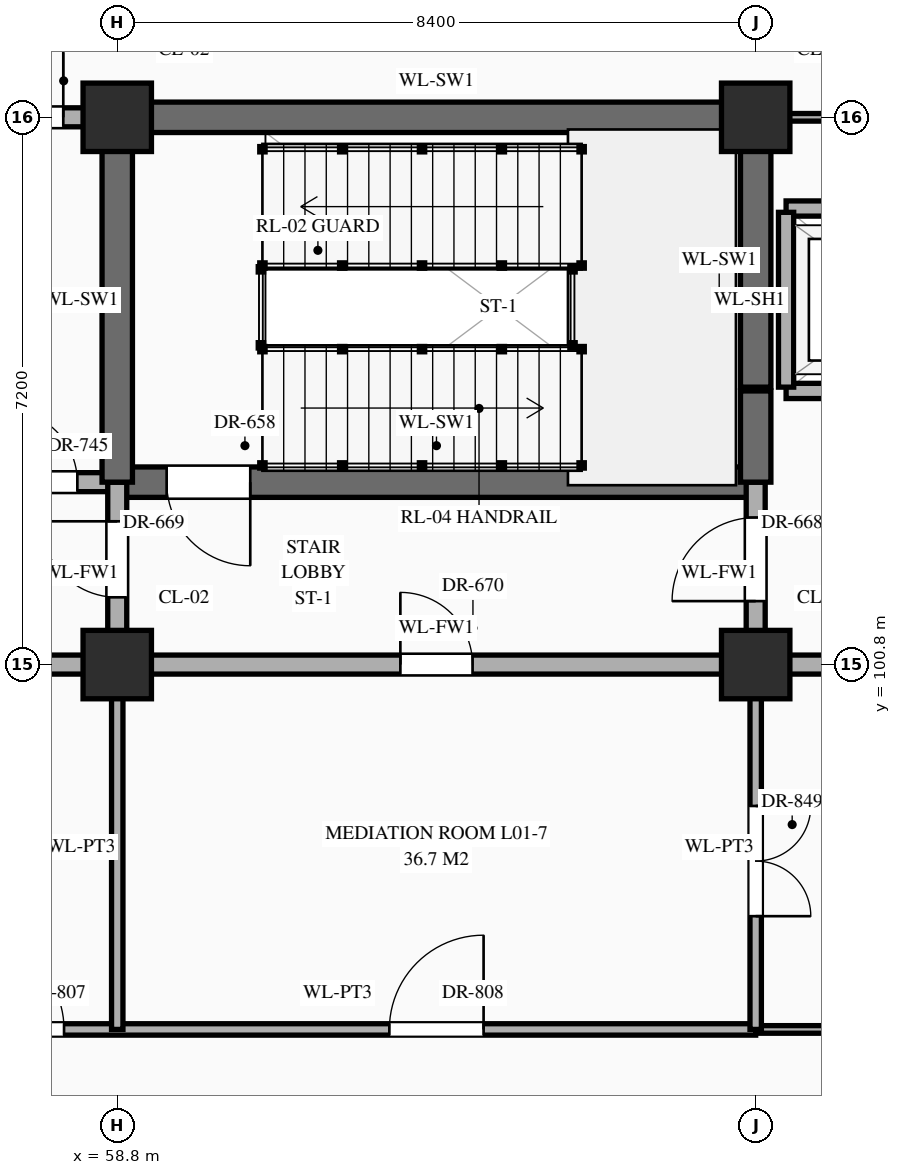
"""IFC4 building model, lengths in metres.
Left out: names, types, materials, properties, quantities, classifications, styles, units other than length and angle.
Written with IfcOpenShell. Run it as: python <this file> out.ifc"""

import sys

from ifc_helpers import new_model, si_unit, direction, frame, frame_2d, origin, origin_2d, place, context, subcontext, project, spatial, rectangle, extrude, element, fill, save


model = new_model("IFC4")
c1 = context("Model", 3, precision=1e-05, world=origin(), true_north=direction((0.0, 1.0)))
c2 = subcontext(c1, "Body", "Model", "MODEL_VIEW")
j1 = project(units=[si_unit("LENGTHUNIT", "METRE"), si_unit("PLANEANGLEUNIT", "RADIAN")], contexts=[c1])
p1 = place(None, origin())
s1 = spatial("IfcSite", under=j1, at=p1, CompositionType="ELEMENT")
p2 = place(p1, origin())
s2 = spatial("IfcBuilding", under=s1, at=p2, CompositionType="ELEMENT")
p3 = place(p2, origin())
s3 = spatial("IfcBuildingStorey", under=s2, at=p3, CompositionType="ELEMENT", Elevation=0.0)
for number, where, z_axis, x_axis in (
    (1, (58.8, 100.8, 0.0), (0.0, 0.0, 1.0), (1.0, 0.0, 0.0)),
    (2, (58.8, 108.0, 0.0), (0.0, 0.0, 1.0), (1.0, 0.0, 0.0)),
    (3, (67.2, 100.8, 0.0), (0.0, 0.0, 1.0), (1.0, 0.0, 0.0)),
    (4, (67.2, 108.0, 0.0), (0.0, 0.0, 1.0), (1.0, 0.0, 0.0)),
):
    element("IfcColumn", number, at=place(p3, frame(where, z_axis=z_axis, x_axis=x_axis)), inside=s3, PredefinedType="COLUMN", context=c2, shape_type="SweptSolid", body=[
        extrude(rectangle(XDim=0.9, YDim=0.9, at=origin_2d()), origin(), (0.0, 0.0, 1.0), 5.4),
    ])
p4 = place(p3, frame((56.2, 96.0, 0.0), z_axis=(0.0, 0.0, 1.0), x_axis=(1.0, 0.0, 0.0)))
e5 = element("IfcWall", 5, at=p4, inside=s3, PredefinedType="STANDARD", context=c2, shape_type="SweptSolid", body=[
    extrude(rectangle(XDim=11.0, YDim=0.15, at=frame_2d((5.5, 0.0))), origin(), (0.0, 0.0, 1.0), 5.12),
])
p5 = place(p4, frame((0.7, 0.0, 0.0)))
e6 = element("IfcOpeningElement", 6, at=p5, cuts=e5, PredefinedType="OPENING", context=c2, shape_type="SweptSolid", body=[
    extrude(rectangle(XDim=1.2, YDim=2.35, at=frame_2d((0.6, 1.175))), frame((0.0, 0.087, 0.0), z_axis=(0.0, -1.0, 0.0), x_axis=(1.0, 0.0, 0.0)), (0.0, 0.0, 1.0), 0.174),
])
p6 = place(p4, frame((6.18, 0.0, 0.0)))
e7 = element("IfcOpeningElement", 7, at=p6, cuts=e5, PredefinedType="OPENING", context=c2, shape_type="SweptSolid", body=[
    extrude(rectangle(XDim=1.24, YDim=2.3, at=frame_2d((0.62, 1.15))), frame((0.0, 0.087, 0.0), z_axis=(0.0, -1.0, 0.0), x_axis=(1.0, 0.0, 0.0)), (0.0, 0.0, 1.0), 0.174),
])
p7 = place(p3, frame((67.2, 96.0, 0.0), z_axis=(0.0, 0.0, 1.0), x_axis=(1.0, 0.0, 0.0)))
e8 = element("IfcWall", 8, at=p7, inside=s3, PredefinedType="STANDARD", context=c2, shape_type="SweptSolid", body=[
    extrude(rectangle(XDim=33.6, YDim=0.1, at=frame_2d((16.8, 0.0))), origin(), (0.0, 0.0, 1.0), 5.12),
])
p8 = place(p7, frame((7.5, 0.0, 0.0)))
e9 = element("IfcOpeningElement", 9, at=p8, cuts=e8, PredefinedType="OPENING", context=c2, shape_type="SweptSolid", body=[
    extrude(rectangle(XDim=1.8, YDim=2.5, at=frame_2d((0.9, 1.25))), frame((0.0, 0.062, 0.0), z_axis=(0.0, -1.0, 0.0), x_axis=(1.0, 0.0, 0.0)), (0.0, 0.0, 1.0), 0.124),
])
p9 = place(p7, frame((24.25, 0.0, 0.0)))
e10 = element("IfcOpeningElement", 10, at=p9, cuts=e8, PredefinedType="OPENING", context=c2, shape_type="SweptSolid", body=[
    extrude(rectangle(XDim=1.9, YDim=2.5, at=frame_2d((0.95, 1.25))), frame((0.0, 0.062, 0.0), z_axis=(0.0, -1.0, 0.0), x_axis=(1.0, 0.0, 0.0)), (0.0, 0.0, 1.0), 0.124),
])
p10 = place(p3, frame((54.6, 100.8, 0.0), z_axis=(0.0, 0.0, 1.0), x_axis=(1.0, 0.0, 0.0)))
e11 = element("IfcWall", 11, at=p10, inside=s3, PredefinedType="STANDARD", context=c2, shape_type="SweptSolid", body=[
    extrude(rectangle(XDim=16.8, YDim=0.25, at=frame_2d((8.4, 0.0))), origin(), (0.0, 0.0, 1.0), 4.27),
])
p11 = place(p10, frame((7.925, 0.0, 0.0)))
e12 = element("IfcOpeningElement", 12, at=p11, cuts=e11, PredefinedType="OPENING", context=c2, shape_type="SweptSolid", body=[
    extrude(rectangle(XDim=0.95, YDim=2.15, at=frame_2d((0.475, 1.075))), frame((0.0, 0.137, 0.0), z_axis=(0.0, -1.0, 0.0), x_axis=(1.0, 0.0, 0.0)), (0.0, 0.0, 1.0), 0.274),
])
p12 = place(p10, frame((13.985, 0.0, 0.0)))
e13 = element("IfcOpeningElement", 13, at=p12, cuts=e11, PredefinedType="OPENING", context=c2, shape_type="SweptSolid", body=[
    extrude(rectangle(XDim=1.8, YDim=2.35, at=frame_2d((0.9, 1.175))), frame((0.0, 0.137, 0.0), z_axis=(0.0, -1.0, 0.0), x_axis=(1.0, 0.0, 0.0)), (0.0, 0.0, 1.0), 0.274),
])
p13 = place(p10, frame((0.25, 0.0, 0.0)))
e14 = element("IfcOpeningElement", 14, at=p13, cuts=e11, PredefinedType="OPENING", context=c2, shape_type="SweptSolid", body=[
    extrude(rectangle(XDim=1.1, YDim=2.2, at=frame_2d((0.55, 1.1))), frame((0.0, 0.137, 0.0), z_axis=(0.0, -1.0, 0.0), x_axis=(1.0, 0.0, 0.0)), (0.0, 0.0, 1.0), 0.274),
])
p14 = place(p3, frame((54.6, 103.2, 0.0), z_axis=(0.0, 0.0, 1.0), x_axis=(1.0, 0.0, 0.0)))
e15 = element("IfcWall", 15, at=p14, inside=s3, PredefinedType="STANDARD", context=c2, shape_type="SweptSolid", body=[
    extrude(rectangle(XDim=4.2, YDim=0.25, at=frame_2d((2.1, 0.0))), origin(), (0.0, 0.0, 1.0), 5.12),
])
p15 = place(p14, frame((0.6, 0.0, 0.0)))
e16 = element("IfcOpeningElement", 16, at=p15, cuts=e15, PredefinedType="OPENING", context=c2, shape_type="SweptSolid", body=[
    extrude(rectangle(XDim=1.0, YDim=2.2, at=frame_2d((0.5, 1.1))), frame((0.0, 0.137, 0.0), z_axis=(0.0, -1.0, 0.0), x_axis=(1.0, 0.0, 0.0)), (0.0, 0.0, 1.0), 0.274),
])
p16 = place(p14, frame((2.725, 0.0, 0.0)))
e17 = element("IfcOpeningElement", 17, at=p16, cuts=e15, PredefinedType="OPENING", context=c2, shape_type="SweptSolid", body=[
    extrude(rectangle(XDim=0.95, YDim=2.15, at=frame_2d((0.475, 1.075))), frame((0.0, 0.137, 0.0), z_axis=(0.0, -1.0, 0.0), x_axis=(1.0, 0.0, 0.0)), (0.0, 0.0, 1.0), 0.274),
])
p17 = place(p3, frame((58.8, 103.2, 0.0), z_axis=(0.0, 0.0, 1.0), x_axis=(1.0, 0.0, 0.0)))
e18 = element("IfcWall", 18, at=p17, inside=s3, PredefinedType="SHEAR", context=c2, shape_type="SweptSolid", body=[
    extrude(rectangle(XDim=8.4, YDim=0.4, at=frame_2d((4.2, 0.0))), origin(), (0.0, 0.0, 1.0), 5.12),
])
p18 = place(p17, frame((0.65, 0.0, 0.0)))
e19 = element("IfcOpeningElement", 19, at=p18, cuts=e18, PredefinedType="OPENING", context=c2, shape_type="SweptSolid", body=[
    extrude(rectangle(XDim=1.1, YDim=2.2, at=frame_2d((0.55, 1.1))), frame((0.0, 0.212, 0.0), z_axis=(0.0, -1.0, 0.0), x_axis=(1.0, 0.0, 0.0)), (0.0, 0.0, 1.0), 0.424),
])
p19 = place(p3, frame((67.6, 104.4, 0.0), z_axis=(0.0, 0.0, 1.0), x_axis=(1.0, 0.0, 0.0)))
e20 = element("IfcWall", 20, at=p19, inside=s3, PredefinedType="STANDARD", context=c2, shape_type="SweptSolid", body=[
    extrude(rectangle(XDim=3.0, YDim=0.2, at=frame_2d((1.5, 0.0))), origin(), (0.0, 0.0, 1.0), 5.12),
])
p20 = place(p19, frame((0.9, 0.0, 0.0)))
e21 = element("IfcOpeningElement", 21, at=p20, cuts=e20, PredefinedType="OPENING", context=c2, shape_type="SweptSolid", body=[
    extrude(rectangle(XDim=1.2, YDim=2.15, at=frame_2d((0.6, 1.075))), frame((0.0, 0.112, 0.0), z_axis=(0.0, -1.0, 0.0), x_axis=(1.0, 0.0, 0.0)), (0.0, 0.0, 1.0), 0.224),
])
p21 = place(p3, frame((67.6, 106.8, 0.0), z_axis=(0.0, 0.0, 1.0), x_axis=(1.0, 0.0, 0.0)))
e22 = element("IfcWall", 22, at=p21, inside=s3, PredefinedType="STANDARD", context=c2, shape_type="SweptSolid", body=[
    extrude(rectangle(XDim=3.0, YDim=0.2, at=frame_2d((1.5, 0.0))), origin(), (0.0, 0.0, 1.0), 5.12),
])
p22 = place(p3, frame((54.6, 108.0, 0.0), z_axis=(0.0, 0.0, 1.0), x_axis=(1.0, 0.0, 0.0)))
e23 = element("IfcWall", 23, at=p22, inside=s3, PredefinedType="STANDARD", context=c2, shape_type="SweptSolid", body=[
    extrude(rectangle(XDim=4.2, YDim=0.25, at=frame_2d((2.1, 0.0))), origin(), (0.0, 0.0, 1.0), 4.27),
])
p23 = place(p22, frame((0.6, 0.0, 0.0)))
e24 = element("IfcOpeningElement", 24, at=p23, cuts=e23, PredefinedType="OPENING", context=c2, shape_type="SweptSolid", body=[
    extrude(rectangle(XDim=1.0, YDim=2.2, at=frame_2d((0.5, 1.1))), frame((0.0, 0.137, 0.0), z_axis=(0.0, -1.0, 0.0), x_axis=(1.0, 0.0, 0.0)), (0.0, 0.0, 1.0), 0.274),
])
p24 = place(p22, frame((2.54, 0.0, 0.0)))
e25 = element("IfcOpeningElement", 25, at=p24, cuts=e23, PredefinedType="OPENING", context=c2, shape_type="SweptSolid", body=[
    extrude(rectangle(XDim=0.95, YDim=2.15, at=frame_2d((0.475, 1.075))), frame((0.0, 0.137, 0.0), z_axis=(0.0, -1.0, 0.0), x_axis=(1.0, 0.0, 0.0)), (0.0, 0.0, 1.0), 0.274),
])
p25 = place(p3, frame((58.8, 108.0, 0.0), z_axis=(0.0, 0.0, 1.0), x_axis=(1.0, 0.0, 0.0)))
e26 = element("IfcWall", 26, at=p25, inside=s3, PredefinedType="SHEAR", context=c2, shape_type="SweptSolid", body=[
    extrude(rectangle(XDim=8.4, YDim=0.4, at=frame_2d((4.2, 0.0))), origin(), (0.0, 0.0, 1.0), 5.12),
])
p26 = place(p3, frame((67.25, 108.0, 0.0), z_axis=(0.0, 0.0, 1.0), x_axis=(1.0, 0.0, 0.0)))
e27 = element("IfcWall", 27, at=p26, inside=s3, PredefinedType="STANDARD", context=c2, shape_type="SweptSolid", body=[
    extrude(rectangle(XDim=4.1, YDim=0.1, at=frame_2d((2.05, 0.0))), origin(), (0.0, 0.0, 1.0), 4.27),
])
p27 = place(p3, frame((58.8, 96.0, 0.0), z_axis=(0.0, 0.0, 1.0), x_axis=(0.0, 1.0, 0.0)))
e28 = element("IfcWall", 28, at=p27, inside=s3, PredefinedType="STANDARD", context=c2, shape_type="SweptSolid", body=[
    extrude(rectangle(XDim=4.8, YDim=0.15, at=frame_2d((2.4, 0.0))), origin(), (0.0, 0.0, 1.0), 4.37),
])
p28 = place(p3, frame((58.8, 100.8, 0.0), z_axis=(0.0, 0.0, 1.0), x_axis=(0.0, 1.0, 0.0)))
e29 = element("IfcWall", 29, at=p28, inside=s3, PredefinedType="STANDARD", context=c2, shape_type="SweptSolid", body=[
    extrude(rectangle(XDim=2.4, YDim=0.25, at=frame_2d((1.2, 0.0))), origin(), (0.0, 0.0, 1.0), 4.37),
])
p29 = place(p28, frame((0.885, 0.0, 0.0)))
e30 = element("IfcOpeningElement", 30, at=p29, cuts=e29, PredefinedType="OPENING", context=c2, shape_type="SweptSolid", body=[
    extrude(rectangle(XDim=1.0, YDim=2.2, at=frame_2d((0.5, 1.1))), frame((0.0, 0.137, 0.0), z_axis=(0.0, -1.0, 0.0), x_axis=(1.0, 0.0, 0.0)), (0.0, 0.0, 1.0), 0.274),
])
p30 = place(p3, frame((58.8, 103.2, 0.0), z_axis=(0.0, 0.0, 1.0), x_axis=(0.0, 1.0, 0.0)))
e31 = element("IfcWall", 31, at=p30, inside=s3, PredefinedType="SHEAR", context=c2, shape_type="SweptSolid", body=[
    extrude(rectangle(XDim=4.8, YDim=0.4, at=frame_2d((2.4, 0.0))), origin(), (0.0, 0.0, 1.0), 5.12),
])
p31 = place(p3, frame((67.2, 96.0, 0.0), z_axis=(0.0, 0.0, 1.0), x_axis=(0.0, 1.0, 0.0)))
e32 = element("IfcWall", 32, at=p31, inside=s3, PredefinedType="STANDARD", context=c2, shape_type="SweptSolid", body=[
    extrude(rectangle(XDim=4.8, YDim=0.15, at=frame_2d((2.4, 0.0))), origin(), (0.0, 0.0, 1.0), 4.37),
])
p32 = place(p31, frame((1.49, 0.0, 0.0)))
e33 = element("IfcOpeningElement", 33, at=p32, cuts=e32, PredefinedType="OPENING", context=c2, shape_type="SweptSolid", body=[
    extrude(rectangle(XDim=1.45, YDim=2.3, at=frame_2d((0.725, 1.15))), frame((0.0, 0.087, 0.0), z_axis=(0.0, -1.0, 0.0), x_axis=(1.0, 0.0, 0.0)), (0.0, 0.0, 1.0), 0.174),
])
p33 = place(p3, frame((67.2, 100.8, 0.0), z_axis=(0.0, 0.0, 1.0), x_axis=(0.0, 1.0, 0.0)))
e34 = element("IfcWall", 34, at=p33, inside=s3, PredefinedType="STANDARD", context=c2, shape_type="SweptSolid", body=[
    extrude(rectangle(XDim=2.4, YDim=0.25, at=frame_2d((1.2, 0.0))), origin(), (0.0, 0.0, 1.0), 4.37),
])
p34 = place(p33, frame((0.835, 0.0, 0.0)))
e35 = element("IfcOpeningElement", 35, at=p34, cuts=e34, PredefinedType="OPENING", context=c2, shape_type="SweptSolid", body=[
    extrude(rectangle(XDim=1.1, YDim=2.2, at=frame_2d((0.55, 1.1))), frame((0.0, 0.137, 0.0), z_axis=(0.0, -1.0, 0.0), x_axis=(1.0, 0.0, 0.0)), (0.0, 0.0, 1.0), 0.274),
])
p35 = place(p3, frame((67.2, 103.2, 0.0), z_axis=(0.0, 0.0, 1.0), x_axis=(0.0, 1.0, 0.0)))
e36 = element("IfcWall", 36, at=p35, inside=s3, PredefinedType="SHEAR", context=c2, shape_type="SweptSolid", body=[
    extrude(rectangle(XDim=1.2, YDim=0.4, at=frame_2d((0.6, 0.0))), origin(), (0.0, 0.0, 1.0), 5.12),
])
p36 = place(p3, frame((67.2, 104.45, 0.0), z_axis=(0.0, 0.0, 1.0), x_axis=(0.0, 1.0, 0.0)))
e37 = element("IfcWall", 37, at=p36, inside=s3, PredefinedType="SHEAR", context=c2, shape_type="SweptSolid", body=[
    extrude(rectangle(XDim=3.5, YDim=0.4, at=frame_2d((1.75, 0.0))), origin(), (0.0, 0.0, 1.0), 5.12),
])
p37 = place(p3, frame((67.6, 104.45, 0.0), z_axis=(0.0, 0.0, 1.0), x_axis=(0.0, 1.0, 0.0)))
e38 = element("IfcWall", 38, at=p37, inside=s3, PredefinedType="STANDARD", context=c2, shape_type="SweptSolid", body=[
    extrude(rectangle(XDim=2.3, YDim=0.2, at=frame_2d((1.15, 0.0))), origin(), (0.0, 0.0, 1.0), 5.12),
])
p38 = place(p18, frame((1.1, 0.0, 0.0), z_axis=(0.0, 0.0, 1.0), x_axis=(-1.0, 0.0, 0.0)))
e39 = element("IfcDoor", 39, at=p38, inside=s3, OperationType="SINGLE_SWING_LEFT", PredefinedType="DOOR", context=c2, shape_type="SweptSolid", body=[
    extrude(rectangle(XDim=1.1, YDim=2.2, at=frame_2d((0.55, 1.1))), frame((0.0, 0.025, 0.0), z_axis=(0.0, -1.0, 0.0), x_axis=(1.0, 0.0, 0.0)), (0.0, 0.0, 1.0), 0.05),
])
fill(e19, e39)
p39 = place(p34, origin())
e40 = element("IfcDoor", 40, at=p39, inside=s3, OperationType="SINGLE_SWING_LEFT", PredefinedType="DOOR", context=c2, shape_type="SweptSolid", body=[
    extrude(rectangle(XDim=1.1, YDim=2.2, at=frame_2d((0.55, 1.1))), frame((0.0, 0.025, 0.0), z_axis=(0.0, -1.0, 0.0), x_axis=(1.0, 0.0, 0.0)), (0.0, 0.0, 1.0), 0.05),
])
fill(e35, e40)
p40 = place(p29, origin())
e41 = element("IfcDoor", 41, at=p40, inside=s3, OperationType="SINGLE_SWING_RIGHT", PredefinedType="DOOR", context=c2, shape_type="SweptSolid", body=[
    extrude(rectangle(XDim=1.0, YDim=2.2, at=frame_2d((0.5, 1.1))), frame((0.0, 0.025, 0.0), z_axis=(0.0, -1.0, 0.0), x_axis=(1.0, 0.0, 0.0)), (0.0, 0.0, 1.0), 0.05),
])
fill(e30, e41)
p41 = place(p11, origin())
e42 = element("IfcDoor", 42, at=p41, inside=s3, OperationType="SINGLE_SWING_LEFT", PredefinedType="DOOR", context=c2, shape_type="SweptSolid", body=[
    extrude(rectangle(XDim=0.95, YDim=2.15, at=frame_2d((0.475, 1.075))), frame((0.0, 0.025, 0.0), z_axis=(0.0, -1.0, 0.0), x_axis=(1.0, 0.0, 0.0)), (0.0, 0.0, 1.0), 0.05),
])
fill(e12, e42)
p42 = place(p16, origin())
e43 = element("IfcDoor", 43, at=p42, inside=s3, OperationType="SINGLE_SWING_LEFT", PredefinedType="DOOR", context=c2, shape_type="SweptSolid", body=[
    extrude(rectangle(XDim=0.95, YDim=2.15, at=frame_2d((0.475, 1.075))), frame((0.0, 0.025, 0.0), z_axis=(0.0, -1.0, 0.0), x_axis=(1.0, 0.0, 0.0)), (0.0, 0.0, 1.0), 0.05),
])
fill(e17, e43)
p43 = place(p24, origin())
e44 = element("IfcDoor", 44, at=p43, inside=s3, OperationType="SINGLE_SWING_RIGHT", PredefinedType="DOOR", context=c2, shape_type="SweptSolid", body=[
    extrude(rectangle(XDim=0.95, YDim=2.15, at=frame_2d((0.475, 1.075))), frame((0.0, 0.025, 0.0), z_axis=(0.0, -1.0, 0.0), x_axis=(1.0, 0.0, 0.0)), (0.0, 0.0, 1.0), 0.05),
])
fill(e25, e44)
p44 = place(p5, origin())
e45 = element("IfcDoor", 45, at=p44, inside=s3, OperationType="SINGLE_SWING_LEFT", PredefinedType="DOOR", context=c2, shape_type="SweptSolid", body=[
    extrude(rectangle(XDim=1.2, YDim=2.35, at=frame_2d((0.6, 1.175))), frame((0.0, 0.025, 0.0), z_axis=(0.0, -1.0, 0.0), x_axis=(1.0, 0.0, 0.0)), (0.0, 0.0, 1.0), 0.05),
])
fill(e6, e45)
p45 = place(p6, origin())
e46 = element("IfcDoor", 46, at=p45, inside=s3, OperationType="SINGLE_SWING_RIGHT", PredefinedType="DOOR", context=c2, shape_type="SweptSolid", body=[
    extrude(rectangle(XDim=1.24, YDim=2.3, at=frame_2d((0.62, 1.15))), frame((0.0, 0.025, 0.0), z_axis=(0.0, -1.0, 0.0), x_axis=(1.0, 0.0, 0.0)), (0.0, 0.0, 1.0), 0.05),
])
fill(e7, e46)
p46 = place(p32, frame((1.45, 0.0, 0.0), z_axis=(0.0, 0.0, 1.0), x_axis=(-1.0, 0.0, 0.0)))
e47 = element("IfcDoor", 47, at=p46, inside=s3, OperationType="DOUBLE_DOOR_SINGLE_SWING", PredefinedType="DOOR", context=c2, shape_type="SweptSolid", body=[
    extrude(rectangle(XDim=1.45, YDim=2.3, at=frame_2d((0.725, 1.15))), frame((0.0, 0.025, 0.0), z_axis=(0.0, -1.0, 0.0), x_axis=(1.0, 0.0, 0.0)), (0.0, 0.0, 1.0), 0.05),
])
fill(e33, e47)
save(model, sys.argv[1])
